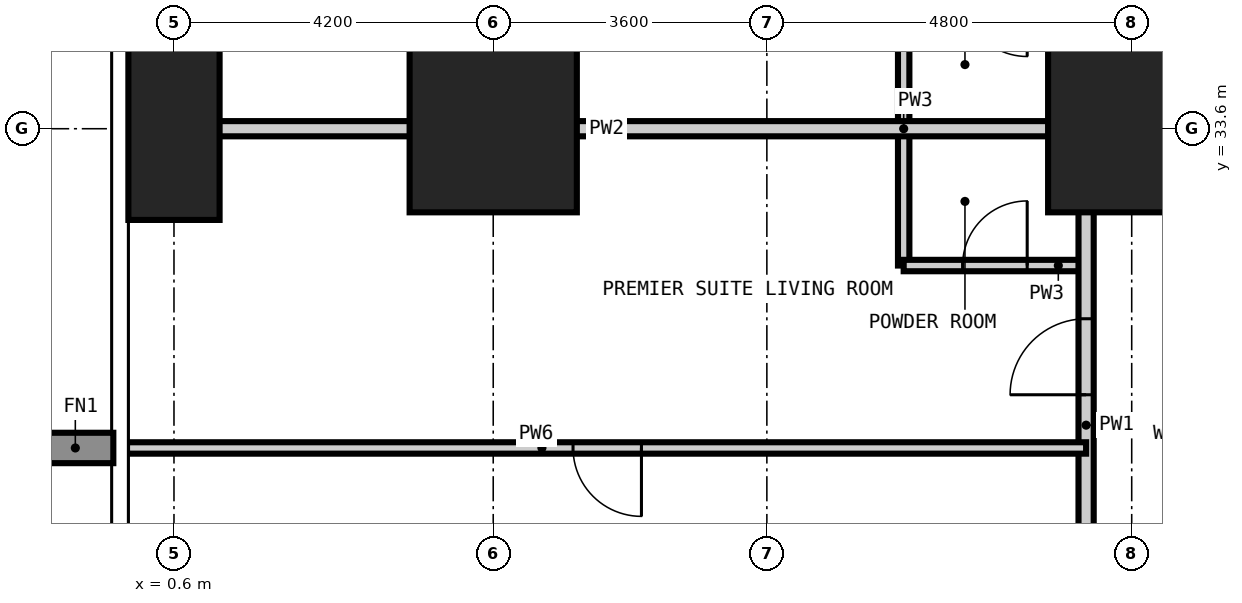
"""IFC4 building model, lengths in metres.
Left out: names, types, materials, properties, quantities, classifications, styles, units other than length and angle.
Written with IfcOpenShell. Run it as: python <this file> out.ifc"""

import sys

from ifc_helpers import new_model, si_unit, direction, frame, frame_2d, origin, origin_2d, place, context, subcontext, project, spatial, rectangle, extrude, element, fill, save


model = new_model("IFC4")
c1 = context("Model", 3, precision=1e-05, world=origin(), true_north=direction((0.0, 1.0)))
c2 = subcontext(c1, "Body", "Model", "MODEL_VIEW")
j1 = project(units=[si_unit("LENGTHUNIT", "METRE"), si_unit("PLANEANGLEUNIT", "RADIAN")], contexts=[c1])
p1 = place(None, origin())
s1 = spatial("IfcSite", under=j1, at=p1, CompositionType="ELEMENT")
p2 = place(p1, origin())
s2 = spatial("IfcBuilding", under=s1, at=p2, CompositionType="ELEMENT")
p3 = place(p2, frame((0.0, 0.0, 97.2)))
s3 = spatial("IfcBuildingStorey", under=s2, at=p3, CompositionType="ELEMENT", Elevation=97.2)
p4 = place(p3, frame((0.6, 33.6, -0.35), z_axis=(0.0, 0.0, 1.0), x_axis=(1.0, 0.0, 0.0)))
e1 = element("IfcColumn", 1, at=p4, inside=s3, PredefinedType="COLUMN", context=c2, shape_type="SweptSolid", body=[
    extrude(rectangle(XDim=1.2, YDim=2.4, at=origin_2d()), origin(), (0.0, 0.0, 1.0), 3.6),
])
for number, where, z_axis, x_axis in (
    (2, (4.8, 33.6, -0.35), (0.0, 0.0, 1.0), (1.0, 0.0, 0.0)),
    (3, (13.2, 33.6, -0.35), (0.0, 0.0, 1.0), (1.0, 0.0, 0.0)),
):
    element("IfcColumn", number, at=place(p3, frame(where, z_axis=z_axis, x_axis=x_axis)), inside=s3, PredefinedType="COLUMN", context=c2, shape_type="SweptSolid", body=[
        extrude(rectangle(XDim=2.2, YDim=2.2, at=origin_2d()), origin(), (0.0, 0.0, 1.0), 3.6),
    ])
p5 = place(p3, frame((10.2, 31.8, 0.0), z_axis=(0.0, 0.0, 1.0), x_axis=(0.0, 1.0, 0.0)))
e4 = element("IfcWall", 4, at=p5, inside=s3, PredefinedType="PARTITIONING", context=c2, shape_type="SweptSolid", body=[
    extrude(rectangle(XDim=3.6, YDim=0.15, at=frame_2d((1.8, 0.0))), origin(), (0.0, 0.0, 1.0), 3.25),
])
p6 = place(p3, frame((10.2, 31.8, 0.0), z_axis=(0.0, 0.0, 1.0), x_axis=(1.0, 0.0, 0.0)))
e5 = element("IfcWall", 5, at=p6, inside=s3, PredefinedType="PARTITIONING", context=c2, shape_type="SweptSolid", body=[
    extrude(rectangle(XDim=2.4, YDim=0.15, at=frame_2d((1.2, 0.0))), origin(), (0.0, 0.0, 1.0), 3.25),
])
p7 = place(p6, frame((0.775, 0.0, 0.0)))
e6 = element("IfcOpeningElement", 6, at=p7, cuts=e5, PredefinedType="OPENING", context=c2, shape_type="SweptSolid", body=[
    extrude(rectangle(XDim=0.85, YDim=2.1, at=frame_2d((0.425, 1.05))), frame((0.0, 0.085, 0.0), z_axis=(0.0, -1.0, 0.0), x_axis=(1.0, 0.0, 0.0)), (0.0, 0.0, 1.0), 0.17),
])
p8 = place(p3, frame((12.6, 13.7, 0.0), z_axis=(0.0, 0.0, 1.0), x_axis=(0.0, 1.0, 0.0)))
e7 = element("IfcWall", 7, at=p8, inside=s3, PredefinedType="PARTITIONING", context=c2, shape_type="SweptSolid", body=[
    extrude(rectangle(XDim=32.0, YDim=0.2, at=frame_2d((16.0, 0.0))), origin(), (0.0, 0.0, 1.0), 3.25),
])
p9 = place(p8, frame((5.6, 0.0, 0.0)))
e8 = element("IfcOpeningElement", 8, at=p9, cuts=e7, PredefinedType="OPENING", context=c2, shape_type="SweptSolid", body=[
    extrude(rectangle(XDim=1.0, YDim=2.2, at=frame_2d((0.5, 1.1))), frame((0.0, 0.11, 0.0), z_axis=(0.0, -1.0, 0.0), x_axis=(1.0, 0.0, 0.0)), (0.0, 0.0, 1.0), 0.22),
])
p10 = place(p8, frame((16.4, 0.0, 0.0)))
e9 = element("IfcOpeningElement", 9, at=p10, cuts=e7, PredefinedType="OPENING", context=c2, shape_type="SweptSolid", body=[
    extrude(rectangle(XDim=1.0, YDim=2.2, at=frame_2d((0.5, 1.1))), frame((0.0, 0.11, 0.0), z_axis=(0.0, -1.0, 0.0), x_axis=(1.0, 0.0, 0.0)), (0.0, 0.0, 1.0), 0.22),
])
p11 = place(p8, frame((22.4, 0.0, 0.0)))
e10 = element("IfcOpeningElement", 10, at=p11, cuts=e7, PredefinedType="OPENING", context=c2, shape_type="SweptSolid", body=[
    extrude(rectangle(XDim=1.0, YDim=2.2, at=frame_2d((0.5, 1.1))), frame((0.0, 0.11, 0.0), z_axis=(0.0, -1.0, 0.0), x_axis=(1.0, 0.0, 0.0)), (0.0, 0.0, 1.0), 0.22),
])
p12 = place(p8, frame((0.95, 0.0, 0.0)))
e11 = element("IfcOpeningElement", 11, at=p12, cuts=e7, PredefinedType="OPENING", context=c2, shape_type="SweptSolid", body=[
    extrude(rectangle(XDim=1.0, YDim=2.2, at=frame_2d((0.5, 1.1))), frame((0.0, 0.11, 0.0), z_axis=(0.0, -1.0, 0.0), x_axis=(1.0, 0.0, 0.0)), (0.0, 0.0, 1.0), 0.22),
])
p13 = place(p8, frame((29.65, 0.0, 0.0)))
e12 = element("IfcOpeningElement", 12, at=p13, cuts=e7, PredefinedType="OPENING", context=c2, shape_type="SweptSolid", body=[
    extrude(rectangle(XDim=1.0, YDim=2.2, at=frame_2d((0.5, 1.1))), frame((0.0, 0.11, 0.0), z_axis=(0.0, -1.0, 0.0), x_axis=(1.0, 0.0, 0.0)), (0.0, 0.0, 1.0), 0.22),
])
p14 = place(p3, frame((-0.018, 33.6, 0.0), z_axis=(0.0, 0.0, 1.0), x_axis=(1.0, 0.0, 0.0)))
e13 = element("IfcWall", 13, at=p14, inside=s3, PredefinedType="PARTITIONING", context=c2, shape_type="SweptSolid", body=[
    extrude(rectangle(XDim=12.618, YDim=0.2, at=frame_2d((6.309, 0.0))), origin(), (0.0, 0.0, 1.0), 3.25),
])
p15 = place(p3, frame((-0.018, 29.4, 0.0), z_axis=(0.0, 0.0, 1.0), x_axis=(1.0, 0.0, 0.0)))
e14 = element("IfcWall", 14, at=p15, inside=s3, PredefinedType="PARTITIONING", context=c2, shape_type="SweptSolid", body=[
    extrude(rectangle(XDim=12.618, YDim=0.15, at=frame_2d((6.309, 0.0))), origin(), (0.0, 0.0, 1.0), 3.25),
])
p16 = place(p15, frame((5.868, 0.0, 0.0)))
e15 = element("IfcOpeningElement", 15, at=p16, cuts=e14, PredefinedType="OPENING", context=c2, shape_type="SweptSolid", body=[
    extrude(rectangle(XDim=0.9, YDim=2.1, at=frame_2d((0.45, 1.05))), frame((0.0, 0.085, 0.0), z_axis=(0.0, -1.0, 0.0), x_axis=(1.0, 0.0, 0.0)), (0.0, 0.0, 1.0), 0.17),
])
p17 = place(p10, origin())
e16 = element("IfcDoor", 16, at=p17, inside=s3, OperationType="SINGLE_SWING_LEFT", PredefinedType="DOOR", context=c2, shape_type="SweptSolid", body=[
    extrude(rectangle(XDim=1.0, YDim=2.2, at=frame_2d((0.5, 1.1))), frame((0.0, 0.025, 0.0), z_axis=(0.0, -1.0, 0.0), x_axis=(1.0, 0.0, 0.0)), (0.0, 0.0, 1.0), 0.05),
])
fill(e9, e16)
p18 = place(p7, origin())
e17 = element("IfcDoor", 17, at=p18, inside=s3, OperationType="SINGLE_SWING_RIGHT", PredefinedType="DOOR", context=c2, shape_type="SweptSolid", body=[
    extrude(rectangle(XDim=0.85, YDim=2.1, at=frame_2d((0.425, 1.05))), frame((0.0, 0.025, 0.0), z_axis=(0.0, -1.0, 0.0), x_axis=(1.0, 0.0, 0.0)), (0.0, 0.0, 1.0), 0.05),
])
fill(e6, e17)
p19 = place(p16, frame((0.9, 0.0, 0.0), z_axis=(0.0, 0.0, 1.0), x_axis=(-1.0, 0.0, 0.0)))
e18 = element("IfcDoor", 18, at=p19, inside=s3, OperationType="SINGLE_SWING_LEFT", PredefinedType="DOOR", context=c2, shape_type="SweptSolid", body=[
    extrude(rectangle(XDim=0.9, YDim=2.1, at=frame_2d((0.45, 1.05))), frame((0.0, 0.025, 0.0), z_axis=(0.0, -1.0, 0.0), x_axis=(1.0, 0.0, 0.0)), (0.0, 0.0, 1.0), 0.05),
])
fill(e15, e18)
save(model, sys.argv[1])
